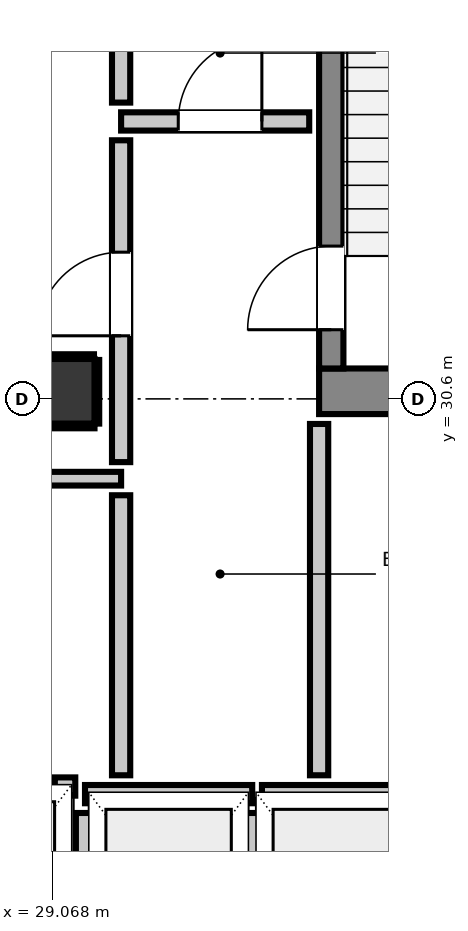
"""IFC4 building model, lengths in metres.
Left out: names, types, materials, properties, quantities, classifications, styles, units other than length and angle.
Written with IfcOpenShell. Run it as: python <this file> out.ifc"""

import sys

from ifc_helpers import new_model, si_unit, direction, frame, frame_2d, origin, origin_2d, place, context, subcontext, project, spatial, rectangle, extrude, element, fill, save


model = new_model("IFC4")
c1 = context("Model", 3, precision=1e-05, world=origin(), true_north=direction((0.0, 1.0)))
c2 = subcontext(c1, "Body", "Model", "MODEL_VIEW")
j1 = project(units=[si_unit("LENGTHUNIT", "METRE"), si_unit("PLANEANGLEUNIT", "RADIAN")], contexts=[c1])
p1 = place(None, origin())
s1 = spatial("IfcSite", under=j1, at=p1, CompositionType="ELEMENT")
p2 = place(p1, origin())
s2 = spatial("IfcBuilding", under=s1, at=p2, CompositionType="ELEMENT")
p3 = place(p2, frame((0.0, 0.0, 273.48)))
s3 = spatial("IfcBuildingStorey", under=s2, at=p3, CompositionType="ELEMENT", Elevation=273.48)
p4 = place(p3, frame((32.58, 30.7, 0.0), z_axis=(0.0, 0.0, 1.0), x_axis=(1.0, 0.0, 0.0)))
e1 = element("IfcWall", 1, at=p4, inside=s3, PredefinedType="SHEAR", context=c2, shape_type="SweptSolid", body=[
    extrude(rectangle(XDim=3.54, YDim=0.6, at=frame_2d((1.77, 0.0))), origin(), (0.0, 0.0, 1.0), 4.6),
])
p5 = place(p3, frame((32.74, 31.0, 0.0), z_axis=(0.0, 0.0, 1.0), x_axis=(0.0, 1.0, 0.0)))
e2 = element("IfcWall", 2, at=p5, inside=s3, PredefinedType="SHEAR", context=c2, shape_type="SweptSolid", body=[
    extrude(rectangle(XDim=7.8, YDim=0.32, at=frame_2d((3.9, 0.0))), origin(), (0.0, 0.0, 1.0), 4.6),
])
p6 = place(p5, frame((0.51, 0.0, 0.0)))
e3 = element("IfcOpeningElement", 3, at=p6, cuts=e2, PredefinedType="OPENING", context=c2, shape_type="SweptSolid", body=[
    extrude(rectangle(XDim=1.1, YDim=2.15, at=frame_2d((0.55, 1.075))), frame((0.0, 0.17, 0.0), z_axis=(0.0, -1.0, 0.0), x_axis=(1.0, 0.0, 0.0)), (0.0, 0.0, 1.0), 0.34),
])
p7 = place(p3, frame((29.2, 30.7, 0.0), z_axis=(0.0, 0.0, 1.0), x_axis=(1.0, 0.0, 0.0)))
e4 = element("IfcColumn", 4, at=p7, inside=s3, PredefinedType="COLUMN", context=c2, shape_type="SweptSolid", body=[
    extrude(rectangle(XDim=0.85, YDim=0.85, at=origin_2d()), origin(), (0.0, 0.0, 1.0), 4.6),
])
p8 = place(p3, frame((29.5, 25.4, 0.0), z_axis=(0.0, 0.0, 1.0), x_axis=(1.0, 0.0, 0.0)))
e5 = element("IfcWall", 5, at=p8, inside=s3, PredefinedType="PARTITIONING", context=c2, shape_type="SweptSolid", body=[
    extrude(rectangle(XDim=2.2, YDim=0.24, at=frame_2d((1.1, 0.0))), origin(), (0.0, 0.0, 1.0), 4.18),
])
p9 = place(p3, frame((29.5, 22.848, 0.0), z_axis=(0.0, 0.0, 1.0), x_axis=(0.0, 1.0, 0.0)))
e6 = element("IfcWall", 6, at=p9, inside=s3, PredefinedType="PARTITIONING", context=c2, shape_type="SweptSolid", body=[
    extrude(rectangle(XDim=2.304, YDim=0.24, at=frame_2d((1.152, 0.0))), origin(), (0.0, 0.0, 1.0), 1.965),
])
p10 = place(p3, frame((31.7, 22.848, 0.0), z_axis=(0.0, 0.0, 1.0), x_axis=(0.0, 1.0, 0.0)))
e7 = element("IfcWall", 7, at=p10, inside=s3, PredefinedType="PARTITIONING", context=c2, shape_type="SweptSolid", body=[
    extrude(rectangle(XDim=2.304, YDim=0.24, at=frame_2d((1.152, 0.0))), origin(), (0.0, 0.0, 1.0), 4.18),
])
p11 = place(p3, frame((31.828, 25.4, 0.0), z_axis=(0.0, 0.0, 1.0), x_axis=(1.0, 0.0, 0.0)))
e8 = element("IfcWall", 8, at=p11, inside=s3, PredefinedType="PARTITIONING", context=c2, shape_type="SweptSolid", body=[
    extrude(rectangle(XDim=2.072, YDim=0.24, at=frame_2d((1.036, 0.0))), origin(), (0.0, 0.0, 1.0), 4.18),
])
p12 = place(p3, frame((29.103, 25.5, 0.0), z_axis=(0.0, 0.0, 1.0), x_axis=(1.0, 0.0, 0.0)))
e9 = element("IfcWall", 9, at=p12, inside=s3, PredefinedType="PARTITIONING", context=c2, shape_type="SweptSolid", body=[
    extrude(rectangle(XDim=0.269, YDim=0.24, at=frame_2d((0.135, 0.0))), origin(), (0.0, 0.0, 1.0), 4.18),
])
p13 = place(p3, frame((29.975, 34.25, 0.0), z_axis=(0.0, 0.0, 1.0), x_axis=(1.0, 0.0, 0.0)))
e10 = element("IfcWall", 10, at=p13, inside=s3, PredefinedType="PARTITIONING", context=c2, shape_type="SweptSolid", body=[
    extrude(rectangle(XDim=2.475, YDim=0.24, at=frame_2d((1.237, 0.0))), origin(), (0.0, 0.0, 1.0), 4.18),
])
p14 = place(p13, frame((0.752, 0.0, 0.0)))
e11 = element("IfcOpeningElement", 11, at=p14, cuts=e10, PredefinedType="OPENING", context=c2, shape_type="SweptSolid", body=[
    extrude(rectangle(XDim=1.1, YDim=2.15, at=frame_2d((0.55, 1.075))), frame((0.0, 0.13, 0.0), z_axis=(0.0, -1.0, 0.0), x_axis=(1.0, 0.0, 0.0)), (0.0, 0.0, 1.0), 0.26),
])
p15 = place(p3, frame((20.65, 29.55, 0.0), z_axis=(0.0, 0.0, 1.0), x_axis=(1.0, 0.0, 0.0)))
e12 = element("IfcWall", 12, at=p15, inside=s3, PredefinedType="PARTITIONING", context=c2, shape_type="SweptSolid", body=[
    extrude(rectangle(XDim=9.325, YDim=0.18, at=frame_2d((4.663, 0.0))), origin(), (0.0, 0.0, 1.0), 4.18),
])
p16 = place(p3, frame((29.975, 25.648, 0.0), z_axis=(0.0, 0.0, 1.0), x_axis=(0.0, 1.0, 0.0)))
e13 = element("IfcWall", 13, at=p16, inside=s3, PredefinedType="PARTITIONING", context=c2, shape_type="SweptSolid", body=[
    extrude(rectangle(XDim=3.684, YDim=0.24, at=frame_2d((1.842, 0.0))), origin(), (0.0, 0.0, 1.0), 4.18),
])
p17 = place(p3, frame((29.975, 29.768, 0.0), z_axis=(0.0, 0.0, 1.0), x_axis=(0.0, 1.0, 0.0)))
e14 = element("IfcWall", 14, at=p17, inside=s3, PredefinedType="PARTITIONING", context=c2, shape_type="SweptSolid", body=[
    extrude(rectangle(XDim=4.234, YDim=0.24, at=frame_2d((2.117, 0.0))), origin(), (0.0, 0.0, 1.0), 4.18),
])
p18 = place(p17, frame((1.662, 0.0, 0.0)))
e15 = element("IfcOpeningElement", 15, at=p18, cuts=e14, PredefinedType="OPENING", context=c2, shape_type="SweptSolid", body=[
    extrude(rectangle(XDim=1.1, YDim=2.15, at=frame_2d((0.55, 1.075))), frame((0.0, 0.13, 0.0), z_axis=(0.0, -1.0, 0.0), x_axis=(1.0, 0.0, 0.0)), (0.0, 0.0, 1.0), 0.26),
])
p19 = place(p3, frame((29.975, 34.498, 0.0), z_axis=(0.0, 0.0, 1.0), x_axis=(0.0, 1.0, 0.0)))
e16 = element("IfcWall", 16, at=p19, inside=s3, PredefinedType="PARTITIONING", context=c2, shape_type="SweptSolid", body=[
    extrude(rectangle(XDim=0.934, YDim=0.24, at=frame_2d((0.467, 0.0))), origin(), (0.0, 0.0, 1.0), 4.18),
])
p20 = place(p3, frame((32.58, 25.648, 0.0), z_axis=(0.0, 0.0, 1.0), x_axis=(0.0, 1.0, 0.0)))
e17 = element("IfcWall", 17, at=p20, inside=s3, PredefinedType="PARTITIONING", context=c2, shape_type="SweptSolid", body=[
    extrude(rectangle(XDim=4.622, YDim=0.24, at=frame_2d((2.311, 0.0))), origin(), (0.0, 0.0, 1.0), 4.18),
])
p21 = place(p3, frame((28.775, 30.243, 0.0), z_axis=(0.0, 0.0, 1.0), x_axis=(1.0, 0.0, 0.0)))
e18 = element("IfcWall", 18, at=p21, inside=s3, PredefinedType="PARTITIONING", context=c2, shape_type="SweptSolid", body=[
    extrude(rectangle(XDim=0.85, YDim=0.06, at=frame_2d((0.425, 0.0))), origin(), (0.0, 0.0, 1.0), 1.45),
])
p22 = place(p3, frame((28.775, 31.157, 0.0), z_axis=(0.0, 0.0, 1.0), x_axis=(1.0, 0.0, 0.0)))
e19 = element("IfcWall", 19, at=p22, inside=s3, PredefinedType="PARTITIONING", context=c2, shape_type="SweptSolid", body=[
    extrude(rectangle(XDim=0.843, YDim=0.06, at=frame_2d((0.421, 0.0))), origin(), (0.0, 0.0, 1.0), 1.45),
])
p23 = place(p3, frame((29.657, 30.275, 0.0), z_axis=(0.0, 0.0, 1.0), x_axis=(0.0, 1.0, 0.0)))
e20 = element("IfcWall", 20, at=p23, inside=s3, PredefinedType="PARTITIONING", context=c2, shape_type="SweptSolid", body=[
    extrude(rectangle(XDim=0.837, YDim=0.06, at=frame_2d((0.418, 0.0))), origin(), (0.0, 0.0, 1.0), 1.45),
])
p24 = place(p6, origin())
e21 = element("IfcDoor", 21, at=p24, inside=s3, OperationType="SINGLE_SWING_LEFT", PredefinedType="DOOR", context=c2, shape_type="SweptSolid", body=[
    extrude(rectangle(XDim=1.1, YDim=2.15, at=frame_2d((0.55, 1.075))), frame((0.0, 0.025, 0.0), z_axis=(0.0, -1.0, 0.0), x_axis=(1.0, 0.0, 0.0)), (0.0, 0.0, 1.0), 0.05),
])
fill(e3, e21)
p25 = place(p18, origin())
e22 = element("IfcDoor", 22, at=p25, inside=s3, OperationType="SINGLE_SWING_LEFT", PredefinedType="DOOR", context=c2, shape_type="SweptSolid", body=[
    extrude(rectangle(XDim=1.1, YDim=2.15, at=frame_2d((0.55, 1.075))), frame((0.0, 0.025, 0.0), z_axis=(0.0, -1.0, 0.0), x_axis=(1.0, 0.0, 0.0)), (0.0, 0.0, 1.0), 0.05),
])
fill(e15, e22)
p26 = place(p14, origin())
e23 = element("IfcDoor", 23, at=p26, inside=s3, OperationType="SINGLE_SWING_RIGHT", PredefinedType="DOOR", context=c2, shape_type="SweptSolid", body=[
    extrude(rectangle(XDim=1.1, YDim=2.15, at=frame_2d((0.55, 1.075))), frame((0.0, 0.025, 0.0), z_axis=(0.0, -1.0, 0.0), x_axis=(1.0, 0.0, 0.0)), (0.0, 0.0, 1.0), 0.05),
])
fill(e11, e23)
save(model, sys.argv[1])
